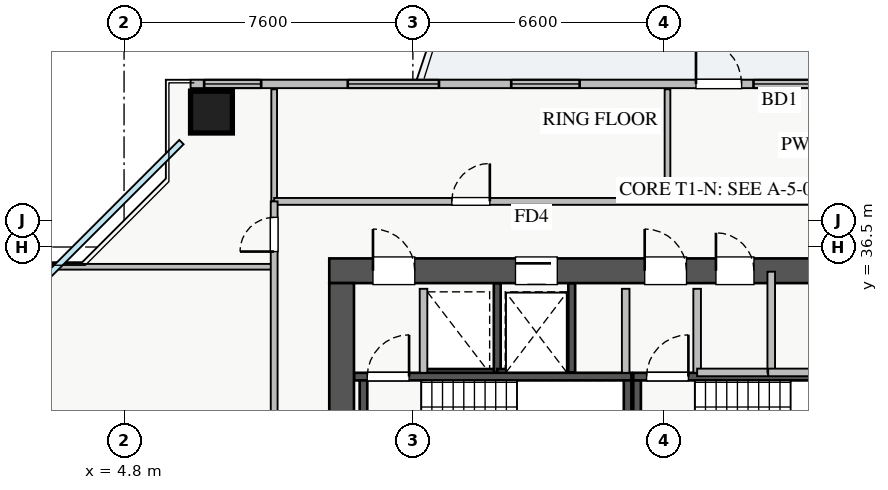
"""IFC4 building model, lengths in metres.
Left out: names, types, materials, properties, quantities, classifications, styles, units other than length and angle.
Written with IfcOpenShell. Run it as: python <this file> out.ifc"""

import sys

from ifc_helpers import new_model, si_unit, direction, frame, frame_2d, origin, origin_2d, place, context, subcontext, project, spatial, rectangle, extrude, source, transform, mapped, element, fill, save


model = new_model("IFC4")
c1 = context("Model", 3, precision=1e-05, world=origin(), true_north=direction((0.0, 1.0)))
c2 = subcontext(c1, "Body", "Model", "MODEL_VIEW")
j1 = project(units=[si_unit("LENGTHUNIT", "METRE"), si_unit("PLANEANGLEUNIT", "RADIAN")], contexts=[c1])
p1 = place(None, origin())
s1 = spatial("IfcSite", under=j1, at=p1, CompositionType="ELEMENT")
p2 = place(p1, origin())
s2 = spatial("IfcBuilding", under=s1, at=p2, CompositionType="ELEMENT")
p3 = place(p2, frame((0.0, 0.0, 106.75)))
s3 = spatial("IfcBuildingStorey", under=s2, at=p3, CompositionType="ELEMENT", Elevation=106.75)
p4 = place(p3, frame((12.68, 33.2, 0.0), z_axis=(0.0, 0.0, 1.0), x_axis=(1.0, 0.0, 0.0)))
e1 = element("IfcWall", 1, at=p4, inside=s3, PredefinedType="SHEAR", context=c2, shape_type="SweptSolid", body=[
    extrude(rectangle(XDim=1.94, YDim=0.18, at=frame_2d((0.97, 0.0))), origin(), (0.0, 0.0, 1.0), 3.07),
])
p5 = place(p3, frame((14.62, 33.2, 0.0), z_axis=(0.0, 0.0, 1.0), x_axis=(0.0, 1.0, 0.0)))
e2 = element("IfcWall", 2, at=p5, inside=s3, PredefinedType="SHEAR", context=c2, shape_type="SweptSolid", body=[
    extrude(rectangle(XDim=2.35, YDim=0.18, at=frame_2d((1.175, 0.0))), origin(), (0.0, 0.0, 1.0), 3.07),
])
p6 = place(p3, frame((14.62, 33.2, 0.0), z_axis=(0.0, 0.0, 1.0), x_axis=(1.0, 0.0, 0.0)))
e3 = element("IfcWall", 3, at=p6, inside=s3, PredefinedType="SHEAR", context=c2, shape_type="SweptSolid", body=[
    extrude(rectangle(XDim=1.96, YDim=0.18, at=frame_2d((0.98, 0.0))), origin(), (0.0, 0.0, 1.0), 3.07),
])
p7 = place(p3, frame((16.58, 33.2, 0.0), z_axis=(0.0, 0.0, 1.0), x_axis=(0.0, 1.0, 0.0)))
e4 = element("IfcWall", 4, at=p7, inside=s3, PredefinedType="SHEAR", context=c2, shape_type="SweptSolid", body=[
    extrude(rectangle(XDim=2.35, YDim=0.18, at=frame_2d((1.175, 0.0))), origin(), (0.0, 0.0, 1.0), 3.07),
])
p8 = place(p3, frame((10.85, 33.09, 0.0), z_axis=(0.0, 0.0, 1.0), x_axis=(1.0, 0.0, 0.0)))
e5 = element("IfcWall", 5, at=p8, inside=s3, PredefinedType="SHEAR", context=c2, shape_type="SweptSolid", body=[
    extrude(rectangle(XDim=7.3, YDim=0.2, at=frame_2d((3.65, 0.0))), origin(), (0.0, 0.0, 1.0), 3.25),
])
p9 = place(p8, frame((0.35, 0.0, 0.0)))
e6 = element("IfcOpeningElement", 6, at=p9, cuts=e5, PredefinedType="OPENING", context=c2, shape_type="SweptSolid", body=[
    extrude(rectangle(XDim=1.1, YDim=2.05, at=frame_2d((0.55, 1.025))), frame((0.0, 0.11, 0.0), z_axis=(0.0, -1.0, 0.0), x_axis=(1.0, 0.0, 0.0)), (0.0, 0.0, 1.0), 0.22),
])
for number, where, z_axis, x_axis in (
    (7, (11.1, 30.05, 0.0), (0.0, 0.0, 1.0), (0.0, 1.0, 0.0)),
    (8, (18.05, 30.05, 0.0), (0.0, 0.0, 1.0), (0.0, 1.0, 0.0)),
):
    element("IfcWall", number, at=place(p3, frame(where, z_axis=z_axis, x_axis=x_axis)), inside=s3, PredefinedType="SHEAR", context=c2, shape_type="SweptSolid", body=[
        extrude(rectangle(XDim=2.94, YDim=0.2, at=frame_2d((1.47, 0.0))), origin(), (0.0, 0.0, 1.0), 3.25),
    ])
p10 = place(p3, frame((18.2, 33.09, 0.0), z_axis=(0.0, 0.0, 1.0), x_axis=(1.0, 0.0, 0.0)))
e9 = element("IfcWall", 9, at=p10, inside=s3, PredefinedType="SHEAR", context=c2, shape_type="SweptSolid", body=[
    extrude(rectangle(XDim=7.15, YDim=0.2, at=frame_2d((3.575, 0.0))), origin(), (0.0, 0.0, 1.0), 3.25),
])
p11 = place(p10, frame((0.35, 0.0, 0.0)))
e10 = element("IfcOpeningElement", 10, at=p11, cuts=e9, PredefinedType="OPENING", context=c2, shape_type="SweptSolid", body=[
    extrude(rectangle(XDim=1.1, YDim=2.05, at=frame_2d((0.55, 1.025))), frame((0.0, 0.11, 0.0), z_axis=(0.0, -1.0, 0.0), x_axis=(1.0, 0.0, 0.0)), (0.0, 0.0, 1.0), 0.22),
])
p12 = place(p3, frame((18.3, 30.05, 0.0), z_axis=(0.0, 0.0, 1.0), x_axis=(0.0, 1.0, 0.0)))
e11 = element("IfcWall", 11, at=p12, inside=s3, PredefinedType="SHEAR", context=c2, shape_type="SweptSolid", body=[
    extrude(rectangle(XDim=2.94, YDim=0.2, at=frame_2d((1.47, 0.0))), origin(), (0.0, 0.0, 1.0), 3.25),
])
p13 = place(p3, frame((10.2, 35.875, 0.0), z_axis=(0.0, 0.0, 1.0), x_axis=(1.0, 0.0, 0.0)))
e12 = element("IfcWall", 12, at=p13, inside=s3, PredefinedType="SHEAR", context=c2, shape_type="SweptSolid", body=[
    extrude(rectangle(XDim=17.6, YDim=0.65, at=frame_2d((8.8, 0.0))), origin(), (0.0, 0.0, 1.0), 3.25),
])
p14 = place(p13, frame((1.15, 0.0, 0.0)))
e13 = element("IfcOpeningElement", 13, at=p14, cuts=e12, PredefinedType="OPENING", context=c2, shape_type="SweptSolid", body=[
    extrude(rectangle(XDim=1.1, YDim=2.05, at=frame_2d((0.55, 1.025))), frame((0.0, 0.335, 0.0), z_axis=(0.0, -1.0, 0.0), x_axis=(1.0, 0.0, 0.0)), (0.0, 0.0, 1.0), 0.67),
])
p15 = place(p13, frame((8.3, 0.0, 0.0)))
e14 = element("IfcOpeningElement", 14, at=p15, cuts=e12, PredefinedType="OPENING", context=c2, shape_type="SweptSolid", body=[
    extrude(rectangle(XDim=1.1, YDim=2.05, at=frame_2d((0.55, 1.025))), frame((0.0, 0.335, 0.0), z_axis=(0.0, -1.0, 0.0), x_axis=(1.0, 0.0, 0.0)), (0.0, 0.0, 1.0), 0.67),
])
p16 = place(p13, frame((4.9, 0.0, 0.0)))
e15 = element("IfcOpeningElement", 15, at=p16, cuts=e12, PredefinedType="OPENING", context=c2, shape_type="SweptSolid", body=[
    extrude(rectangle(XDim=1.1, YDim=2.05, at=frame_2d((0.55, 1.025))), frame((0.0, 0.335, 0.0), z_axis=(0.0, -1.0, 0.0), x_axis=(1.0, 0.0, 0.0)), (0.0, 0.0, 1.0), 0.67),
])
p17 = place(p13, frame((14.74, 0.0, 0.0)))
e16 = element("IfcOpeningElement", 16, at=p17, cuts=e12, PredefinedType="OPENING", context=c2, shape_type="SweptSolid", body=[
    extrude(rectangle(XDim=1.0, YDim=2.05, at=frame_2d((0.5, 1.025))), frame((0.0, 0.335, 0.0), z_axis=(0.0, -1.0, 0.0), x_axis=(1.0, 0.0, 0.0)), (0.0, 0.0, 1.0), 0.67),
])
p18 = place(p13, frame((10.175, 0.0, 0.0)))
e17 = element("IfcOpeningElement", 17, at=p18, cuts=e12, PredefinedType="OPENING", context=c2, shape_type="SweptSolid", body=[
    extrude(rectangle(XDim=1.0, YDim=2.05, at=frame_2d((0.5, 1.025))), frame((0.0, 0.335, 0.0), z_axis=(0.0, -1.0, 0.0), x_axis=(1.0, 0.0, 0.0)), (0.0, 0.0, 1.0), 0.67),
])
p19 = place(p13, frame((12.625, 0.0, 0.0)))
e18 = element("IfcOpeningElement", 18, at=p19, cuts=e12, PredefinedType="OPENING", context=c2, shape_type="SweptSolid", body=[
    extrude(rectangle(XDim=1.0, YDim=2.05, at=frame_2d((0.5, 1.025))), frame((0.0, 0.335, 0.0), z_axis=(0.0, -1.0, 0.0), x_axis=(1.0, 0.0, 0.0)), (0.0, 0.0, 1.0), 0.67),
])
p20 = place(p3, frame((10.525, 29.65, 0.0), z_axis=(0.0, 0.0, 1.0), x_axis=(0.0, 1.0, 0.0)))
e19 = element("IfcWall", 19, at=p20, inside=s3, PredefinedType="SHEAR", context=c2, shape_type="SweptSolid", body=[
    extrude(rectangle(XDim=5.9, YDim=0.65, at=frame_2d((2.95, 0.0))), origin(), (0.0, 0.0, 1.0), 3.25),
])
m1 = source(origin(), c2, "Body", "SweptSolid", [
    extrude(rectangle(XDim=1.1, YDim=1.1, at=origin_2d()), origin(), (0.0, 0.0, 1.0), 3.25),
])
p21 = place(p3, frame((7.1, 40.05, 0.0), z_axis=(0.0, 0.0, 1.0), x_axis=(1.0, 0.0, 0.0)))
e20 = element("IfcColumn", 20, at=p21, inside=s3, PredefinedType="COLUMN", context=c2, shape_type="MappedRepresentation", body=[
    mapped(m1, transform((0.0, 0.0, 0.0), x_axis=(1.0, 0.0, 0.0), y_axis=(0.0, 1.0, 0.0), z_axis=(0.0, 0.0, 1.0), scale=1.0)),
])
p22 = place(p3, frame((6.55, 40.79, 0.0), z_axis=(0.0, 0.0, 1.0), x_axis=(1.0, 0.0, 0.0)))
e21 = element("IfcWall", 21, at=p22, inside=s3, PredefinedType="STANDARD", context=c2, shape_type="SweptSolid", body=[
    extrude(rectangle(XDim=24.9, YDim=0.22, at=frame_2d((12.45, 0.0))), origin(), (0.0, 0.0, 1.0), 2.61),
])
p23 = place(p22, frame((13.3, 0.0, 0.0)))
e22 = element("IfcOpeningElement", 22, at=p23, cuts=e21, PredefinedType="OPENING", context=c2, shape_type="SweptSolid", body=[
    extrude(rectangle(XDim=1.2, YDim=2.1, at=frame_2d((0.6, 1.05))), frame((0.0, 0.12, 0.0), z_axis=(0.0, -1.0, 0.0), x_axis=(1.0, 0.0, 0.0)), (0.0, 0.0, 1.0), 0.24),
])
p24 = place(p22, frame((0.357, 0.0, 0.9)))
e23 = element("IfcOpeningElement", 23, at=p24, cuts=e21, PredefinedType="OPENING", context=c2, shape_type="SweptSolid", body=[
    extrude(rectangle(XDim=1.5, YDim=1.5, at=frame_2d((0.75, 0.75))), frame((0.0, 0.12, 0.0), z_axis=(0.0, -1.0, 0.0), x_axis=(1.0, 0.0, 0.0)), (0.0, 0.0, 1.0), 0.24),
])
p25 = place(p22, frame((8.438, 0.0, 0.9)))
e24 = element("IfcOpeningElement", 24, at=p25, cuts=e21, PredefinedType="OPENING", context=c2, shape_type="SweptSolid", body=[
    extrude(rectangle(XDim=1.8, YDim=1.45, at=frame_2d((0.9, 0.725))), frame((0.0, 0.12, 0.0), z_axis=(0.0, -1.0, 0.0), x_axis=(1.0, 0.0, 0.0)), (0.0, 0.0, 1.0), 0.24),
])
p26 = place(p22, frame((14.813, 0.0, 0.9)))
e25 = element("IfcOpeningElement", 25, at=p26, cuts=e21, PredefinedType="OPENING", context=c2, shape_type="SweptSolid", body=[
    extrude(rectangle(XDim=1.5, YDim=1.45, at=frame_2d((0.75, 0.725))), frame((0.0, 0.12, 0.0), z_axis=(0.0, -1.0, 0.0), x_axis=(1.0, 0.0, 0.0)), (0.0, 0.0, 1.0), 0.24),
])
p27 = place(p22, frame((20.738, 0.0, 0.9)))
e26 = element("IfcOpeningElement", 26, at=p27, cuts=e21, PredefinedType="OPENING", context=c2, shape_type="SweptSolid", body=[
    extrude(rectangle(XDim=2.1, YDim=1.48, at=frame_2d((1.05, 0.74))), frame((0.0, 0.12, 0.0), z_axis=(0.0, -1.0, 0.0), x_axis=(1.0, 0.0, 0.0)), (0.0, 0.0, 1.0), 0.24),
])
p28 = place(p22, frame((4.136, 0.0, 0.9)))
e27 = element("IfcOpeningElement", 27, at=p28, cuts=e21, PredefinedType="OPENING", context=c2, shape_type="SweptSolid", body=[
    extrude(rectangle(XDim=2.4, YDim=1.5, at=frame_2d((1.2, 0.75))), frame((0.0, 0.12, 0.0), z_axis=(0.0, -1.0, 0.0), x_axis=(1.0, 0.0, 0.0)), (0.0, 0.0, 1.0), 0.24),
])
for number, where, z_axis, x_axis in (
    (28, (12.68, 33.19, 0.0), (0.0, 0.0, 1.0), (0.0, 1.0, 0.0)),
    (29, (18.0, 33.19, 0.0), (0.0, 0.0, 1.0), (0.0, 1.0, 0.0)),
    (30, (19.88, 33.19, 0.0), (0.0, 0.0, 1.0), (0.0, 1.0, 0.0)),
):
    element("IfcWall", number, at=place(p3, frame(where, z_axis=z_axis, x_axis=x_axis)), inside=s3, PredefinedType="PARTITIONING", context=c2, shape_type="SweptSolid", body=[
        extrude(rectangle(XDim=2.21, YDim=0.2, at=frame_2d((1.105, 0.0))), origin(), (0.0, 0.0, 1.0), 3.07),
    ])
p29 = place(p3, frame((19.88, 33.2, 0.0), z_axis=(0.0, 0.0, 1.0), x_axis=(1.0, 0.0, 0.0)))
e31 = element("IfcWall", 31, at=p29, inside=s3, PredefinedType="PARTITIONING", context=c2, shape_type="SweptSolid", body=[
    extrude(rectangle(XDim=1.87, YDim=0.2, at=frame_2d((0.935, 0.0))), origin(), (0.0, 0.0, 1.0), 3.07),
])
p30 = place(p3, frame((21.83, 33.2, 0.0), z_axis=(0.0, 0.0, 1.0), x_axis=(0.0, 1.0, 0.0)))
e32 = element("IfcWall", 32, at=p30, inside=s3, PredefinedType="PARTITIONING", context=c2, shape_type="SweptSolid", body=[
    extrude(rectangle(XDim=2.65, YDim=0.2, at=frame_2d((1.325, 0.0))), origin(), (0.0, 0.0, 1.0), 3.07),
])
p31 = place(p3, frame((21.75, 33.2, 0.0), z_axis=(0.0, 0.0, 1.0), x_axis=(1.0, 0.0, 0.0)))
e33 = element("IfcWall", 33, at=p31, inside=s3, PredefinedType="PARTITIONING", context=c2, shape_type="SweptSolid", body=[
    extrude(rectangle(XDim=5.17, YDim=0.2, at=frame_2d((2.585, 0.0))), origin(), (0.0, 0.0, 1.0), 3.07),
])
p32 = place(p3, frame((19.1, 37.7, 0.0), z_axis=(0.0, 0.0, 1.0), x_axis=(0.0, 1.0, 0.0)))
e34 = element("IfcWall", 34, at=p32, inside=s3, PredefinedType="PARTITIONING", context=c2, shape_type="SweptSolid", body=[
    extrude(rectangle(XDim=2.95, YDim=0.15, at=frame_2d((1.475, 0.0))), origin(), (0.0, 0.0, 1.0), 2.715),
])
p33 = place(p3, frame((8.75, 37.7, 0.0), z_axis=(0.0, 0.0, 1.0), x_axis=(0.0, 1.0, 0.0)))
e35 = element("IfcWall", 35, at=p33, inside=s3, PredefinedType="PARTITIONING", context=c2, shape_type="SweptSolid", body=[
    extrude(rectangle(XDim=2.95, YDim=0.15, at=frame_2d((1.475, 0.0))), origin(), (0.0, 0.0, 1.0), 3.07),
])
p34 = place(p3, frame((8.75, 37.7, 0.0), z_axis=(0.0, 0.0, 1.0), x_axis=(1.0, 0.0, 0.0)))
e36 = element("IfcWall", 36, at=p34, inside=s3, PredefinedType="PARTITIONING", context=c2, shape_type="SweptSolid", body=[
    extrude(rectangle(XDim=23.61, YDim=0.18, at=frame_2d((11.805, 0.0))), origin(), (0.0, 0.0, 1.0), 3.07),
])
p35 = place(p34, frame((4.675, 0.0, 0.0)))
e37 = element("IfcOpeningElement", 37, at=p35, cuts=e36, PredefinedType="OPENING", context=c2, shape_type="SweptSolid", body=[
    extrude(rectangle(XDim=1.0, YDim=2.05, at=frame_2d((0.5, 1.025))), frame((0.0, 0.1, 0.0), z_axis=(0.0, -1.0, 0.0), x_axis=(1.0, 0.0, 0.0)), (0.0, 0.0, 1.0), 0.2),
])
p36 = place(p34, frame((16.29, 0.0, 0.0)))
e38 = element("IfcOpeningElement", 38, at=p36, cuts=e36, PredefinedType="OPENING", context=c2, shape_type="SweptSolid", body=[
    extrude(rectangle(XDim=1.0, YDim=2.05, at=frame_2d((0.5, 1.025))), frame((0.0, 0.1, 0.0), z_axis=(0.0, -1.0, 0.0), x_axis=(1.0, 0.0, 0.0)), (0.0, 0.0, 1.0), 0.2),
])
p37 = place(p3, frame((1.35, 35.98, 0.0), z_axis=(0.0, 0.0, 1.0), x_axis=(1.0, 0.0, 0.0)))
e39 = element("IfcWall", 39, at=p37, inside=s3, PredefinedType="PARTITIONING", context=c2, shape_type="SweptSolid", body=[
    extrude(rectangle(XDim=7.4, YDim=0.15, at=frame_2d((3.7, 0.0))), origin(), (0.0, 0.0, 1.0), 3.07),
])
p38 = place(p3, frame((8.75, 8.3, 0.0), z_axis=(0.0, 0.0, 1.0), x_axis=(0.0, 1.0, 0.0)))
e40 = element("IfcWall", 40, at=p38, inside=s3, PredefinedType="PARTITIONING", context=c2, shape_type="SweptSolid", body=[
    extrude(rectangle(XDim=29.4, YDim=0.18, at=frame_2d((14.7, 0.0))), origin(), (0.0, 0.0, 1.0), 3.07),
])
p39 = place(p38, frame((28.08, 0.0, 0.0)))
e41 = element("IfcOpeningElement", 41, at=p39, cuts=e40, PredefinedType="OPENING", context=c2, shape_type="SweptSolid", body=[
    extrude(rectangle(XDim=0.9, YDim=2.05, at=frame_2d((0.45, 1.025))), frame((0.0, 0.1, 0.0), z_axis=(0.0, -1.0, 0.0), x_axis=(1.0, 0.0, 0.0)), (0.0, 0.0, 1.0), 0.2),
])
p40 = place(p38, frame((0.245, 0.0, 0.0)))
e42 = element("IfcOpeningElement", 42, at=p40, cuts=e40, PredefinedType="OPENING", context=c2, shape_type="SweptSolid", body=[
    extrude(rectangle(XDim=0.9, YDim=2.05, at=frame_2d((0.45, 1.025))), frame((0.0, 0.1, 0.0), z_axis=(0.0, -1.0, 0.0), x_axis=(1.0, 0.0, 0.0)), (0.0, 0.0, 1.0), 0.2),
])
p41 = place(p38, frame((2.95, 0.0, 0.0)))
e43 = element("IfcOpeningElement", 43, at=p41, cuts=e40, PredefinedType="OPENING", context=c2, shape_type="SweptSolid", body=[
    extrude(rectangle(XDim=1.0, YDim=2.05, at=frame_2d((0.5, 1.025))), frame((0.0, 0.1, 0.0), z_axis=(0.0, -1.0, 0.0), x_axis=(1.0, 0.0, 0.0)), (0.0, 0.0, 1.0), 0.2),
])
p42 = place(p38, frame((12.08, 0.0, 0.0)))
e44 = element("IfcOpeningElement", 44, at=p42, cuts=e40, PredefinedType="OPENING", context=c2, shape_type="SweptSolid", body=[
    extrude(rectangle(XDim=1.0, YDim=2.05, at=frame_2d((0.5, 1.025))), frame((0.0, 0.1, 0.0), z_axis=(0.0, -1.0, 0.0), x_axis=(1.0, 0.0, 0.0)), (0.0, 0.0, 1.0), 0.2),
])
p43 = place(p38, frame((22.795, 0.0, 0.0)))
e45 = element("IfcOpeningElement", 45, at=p43, cuts=e40, PredefinedType="OPENING", context=c2, shape_type="SweptSolid", body=[
    extrude(rectangle(XDim=1.0, YDim=2.05, at=frame_2d((0.5, 1.025))), frame((0.0, 0.1, 0.0), z_axis=(0.0, -1.0, 0.0), x_axis=(1.0, 0.0, 0.0)), (0.0, 0.0, 1.0), 0.2),
])
m2 = source(origin(), c2, "Body", "SweptSolid", [
    extrude(rectangle(XDim=1.2, YDim=2.1, at=frame_2d((0.6, 1.05))), frame((0.0, 0.025, 0.0), z_axis=(0.0, -1.0, 0.0), x_axis=(1.0, 0.0, 0.0)), (0.0, 0.0, 1.0), 0.05),
])
p44 = place(p23, origin())
e46 = element("IfcDoor", 46, at=p44, inside=s3, OperationType="SINGLE_SWING_LEFT", PredefinedType="DOOR", context=c2, shape_type="MappedRepresentation", body=[
    mapped(m2, transform((0.0, 0.0, 0.0), x_axis=(1.0, 0.0, 0.0), y_axis=(0.0, 1.0, 0.0), z_axis=(0.0, 0.0, 1.0), scale=1.0)),
])
fill(e22, e46)
m3 = source(origin(), c2, "Body", "SweptSolid", [
    extrude(rectangle(XDim=1.5, YDim=1.5, at=frame_2d((0.75, 0.75))), frame((0.0, 0.03, 0.0), z_axis=(0.0, -1.0, 0.0), x_axis=(1.0, 0.0, 0.0)), (0.0, 0.0, 1.0), 0.06),
])
p45 = place(p24, origin())
e47 = element("IfcWindow", 47, at=p45, inside=s3, PartitioningType="TRIPLE_PANEL_VERTICAL", PredefinedType="WINDOW", context=c2, shape_type="MappedRepresentation", body=[
    mapped(m3, transform((0.0, 0.0, 0.0), x_axis=(1.0, 0.0, 0.0), y_axis=(0.0, 1.0, 0.0), z_axis=(0.0, 0.0, 1.0), scale=1.0)),
])
fill(e23, e47)
m4 = source(origin(), c2, "Body", "SweptSolid", [
    extrude(rectangle(XDim=1.8, YDim=1.45, at=frame_2d((0.9, 0.725))), frame((0.0, 0.03, 0.0), z_axis=(0.0, -1.0, 0.0), x_axis=(1.0, 0.0, 0.0)), (0.0, 0.0, 1.0), 0.06),
])
p46 = place(p25, origin())
e48 = element("IfcWindow", 48, at=p46, inside=s3, PartitioningType="DOUBLE_PANEL_VERTICAL", PredefinedType="WINDOW", context=c2, shape_type="MappedRepresentation", body=[
    mapped(m4, transform((0.0, 0.0, 0.0), x_axis=(1.0, 0.0, 0.0), y_axis=(0.0, 1.0, 0.0), z_axis=(0.0, 0.0, 1.0), scale=1.0)),
])
fill(e24, e48)
m5 = source(origin(), c2, "Body", "SweptSolid", [
    extrude(rectangle(XDim=1.5, YDim=1.45, at=frame_2d((0.75, 0.725))), frame((0.0, 0.03, 0.0), z_axis=(0.0, -1.0, 0.0), x_axis=(1.0, 0.0, 0.0)), (0.0, 0.0, 1.0), 0.06),
])
p47 = place(p26, origin())
e49 = element("IfcWindow", 49, at=p47, inside=s3, PartitioningType="DOUBLE_PANEL_VERTICAL", PredefinedType="WINDOW", context=c2, shape_type="MappedRepresentation", body=[
    mapped(m5, transform((0.0, 0.0, 0.0), x_axis=(1.0, 0.0, 0.0), y_axis=(0.0, 1.0, 0.0), z_axis=(0.0, 0.0, 1.0), scale=1.0)),
])
fill(e25, e49)
m6 = source(origin(), c2, "Body", "SweptSolid", [
    extrude(rectangle(XDim=1.1, YDim=2.05, at=frame_2d((0.55, 1.025))), frame((0.0, 0.025, 0.0), z_axis=(0.0, -1.0, 0.0), x_axis=(1.0, 0.0, 0.0)), (0.0, 0.0, 1.0), 0.05),
])
p48 = place(p14, origin())
e50 = element("IfcDoor", 50, at=p48, inside=s3, OperationType="SINGLE_SWING_LEFT", PredefinedType="DOOR", context=c2, shape_type="MappedRepresentation", body=[
    mapped(m6, transform((0.0, 0.0, 0.0), x_axis=(1.0, 0.0, 0.0), y_axis=(0.0, 1.0, 0.0), z_axis=(0.0, 0.0, 1.0), scale=1.0)),
])
fill(e13, e50)
p49 = place(p9, origin())
e51 = element("IfcDoor", 51, at=p49, inside=s3, OperationType="SINGLE_SWING_RIGHT", PredefinedType="DOOR", context=c2, shape_type="MappedRepresentation", body=[
    mapped(m6, transform((0.0, 0.0, 0.0), x_axis=(1.0, 0.0, 0.0), y_axis=(0.0, 1.0, 0.0), z_axis=(0.0, 0.0, 1.0), scale=1.0)),
])
fill(e6, e51)
p50 = place(p15, origin())
e52 = element("IfcDoor", 52, at=p50, inside=s3, OperationType="SINGLE_SWING_LEFT", PredefinedType="DOOR", context=c2, shape_type="MappedRepresentation", body=[
    mapped(m6, transform((0.0, 0.0, 0.0), x_axis=(1.0, 0.0, 0.0), y_axis=(0.0, 1.0, 0.0), z_axis=(0.0, 0.0, 1.0), scale=1.0)),
])
fill(e14, e52)
p51 = place(p11, origin())
e53 = element("IfcDoor", 53, at=p51, inside=s3, OperationType="SINGLE_SWING_RIGHT", PredefinedType="DOOR", context=c2, shape_type="MappedRepresentation", body=[
    mapped(m6, transform((0.0, 0.0, 0.0), x_axis=(1.0, 0.0, 0.0), y_axis=(0.0, 1.0, 0.0), z_axis=(0.0, 0.0, 1.0), scale=1.0)),
])
fill(e10, e53)
p52 = place(p16, origin())
e54 = element("IfcDoor", 54, at=p52, inside=s3, OperationType="SLIDING_TO_LEFT", PredefinedType="DOOR", context=c2, shape_type="MappedRepresentation", body=[
    mapped(m6, transform((0.0, 0.0, 0.0), x_axis=(1.0, 0.0, 0.0), y_axis=(0.0, 1.0, 0.0), z_axis=(0.0, 0.0, 1.0), scale=1.0)),
])
fill(e15, e54)
m7 = source(origin(), c2, "Body", "SweptSolid", [
    extrude(rectangle(XDim=1.0, YDim=2.05, at=frame_2d((0.5, 1.025))), frame((0.0, 0.025, 0.0), z_axis=(0.0, -1.0, 0.0), x_axis=(1.0, 0.0, 0.0)), (0.0, 0.0, 1.0), 0.05),
])
p53 = place(p18, origin())
e55 = element("IfcDoor", 55, at=p53, inside=s3, OperationType="SINGLE_SWING_LEFT", PredefinedType="DOOR", context=c2, shape_type="MappedRepresentation", body=[
    mapped(m7, transform((0.0, 0.0, 0.0), x_axis=(1.0, 0.0, 0.0), y_axis=(0.0, 1.0, 0.0), z_axis=(0.0, 0.0, 1.0), scale=1.0)),
])
fill(e17, e55)
p54 = place(p35, origin())
e56 = element("IfcDoor", 56, at=p54, inside=s3, OperationType="SINGLE_SWING_RIGHT", PredefinedType="DOOR", context=c2, shape_type="MappedRepresentation", body=[
    mapped(m7, transform((0.0, 0.0, 0.0), x_axis=(1.0, 0.0, 0.0), y_axis=(0.0, 1.0, 0.0), z_axis=(0.0, 0.0, 1.0), scale=1.0)),
])
fill(e37, e56)
m8 = source(origin(), c2, "Body", "SweptSolid", [
    extrude(rectangle(XDim=0.9, YDim=2.05, at=frame_2d((0.45, 1.025))), frame((0.0, 0.025, 0.0), z_axis=(0.0, -1.0, 0.0), x_axis=(1.0, 0.0, 0.0)), (0.0, 0.0, 1.0), 0.05),
])
p55 = place(p39, origin())
e57 = element("IfcDoor", 57, at=p55, inside=s3, OperationType="SINGLE_SWING_LEFT", PredefinedType="DOOR", context=c2, shape_type="MappedRepresentation", body=[
    mapped(m8, transform((0.0, 0.0, 0.0), x_axis=(1.0, 0.0, 0.0), y_axis=(0.0, 1.0, 0.0), z_axis=(0.0, 0.0, 1.0), scale=1.0)),
])
fill(e41, e57)
m9 = source(origin(), c2, "Body", "SweptSolid", [
    extrude(rectangle(XDim=2.4, YDim=1.5, at=frame_2d((1.2, 0.75))), frame((0.0, 0.03, 0.0), z_axis=(0.0, -1.0, 0.0), x_axis=(1.0, 0.0, 0.0)), (0.0, 0.0, 1.0), 0.06),
])
p56 = place(p28, origin())
e58 = element("IfcWindow", 58, at=p56, inside=s3, PartitioningType="TRIPLE_PANEL_VERTICAL", PredefinedType="WINDOW", context=c2, shape_type="MappedRepresentation", body=[
    mapped(m9, transform((0.0, 0.0, 0.0), x_axis=(1.0, 0.0, 0.0), y_axis=(0.0, 1.0, 0.0), z_axis=(0.0, 0.0, 1.0), scale=1.0)),
])
fill(e27, e58)
save(model, sys.argv[1])
